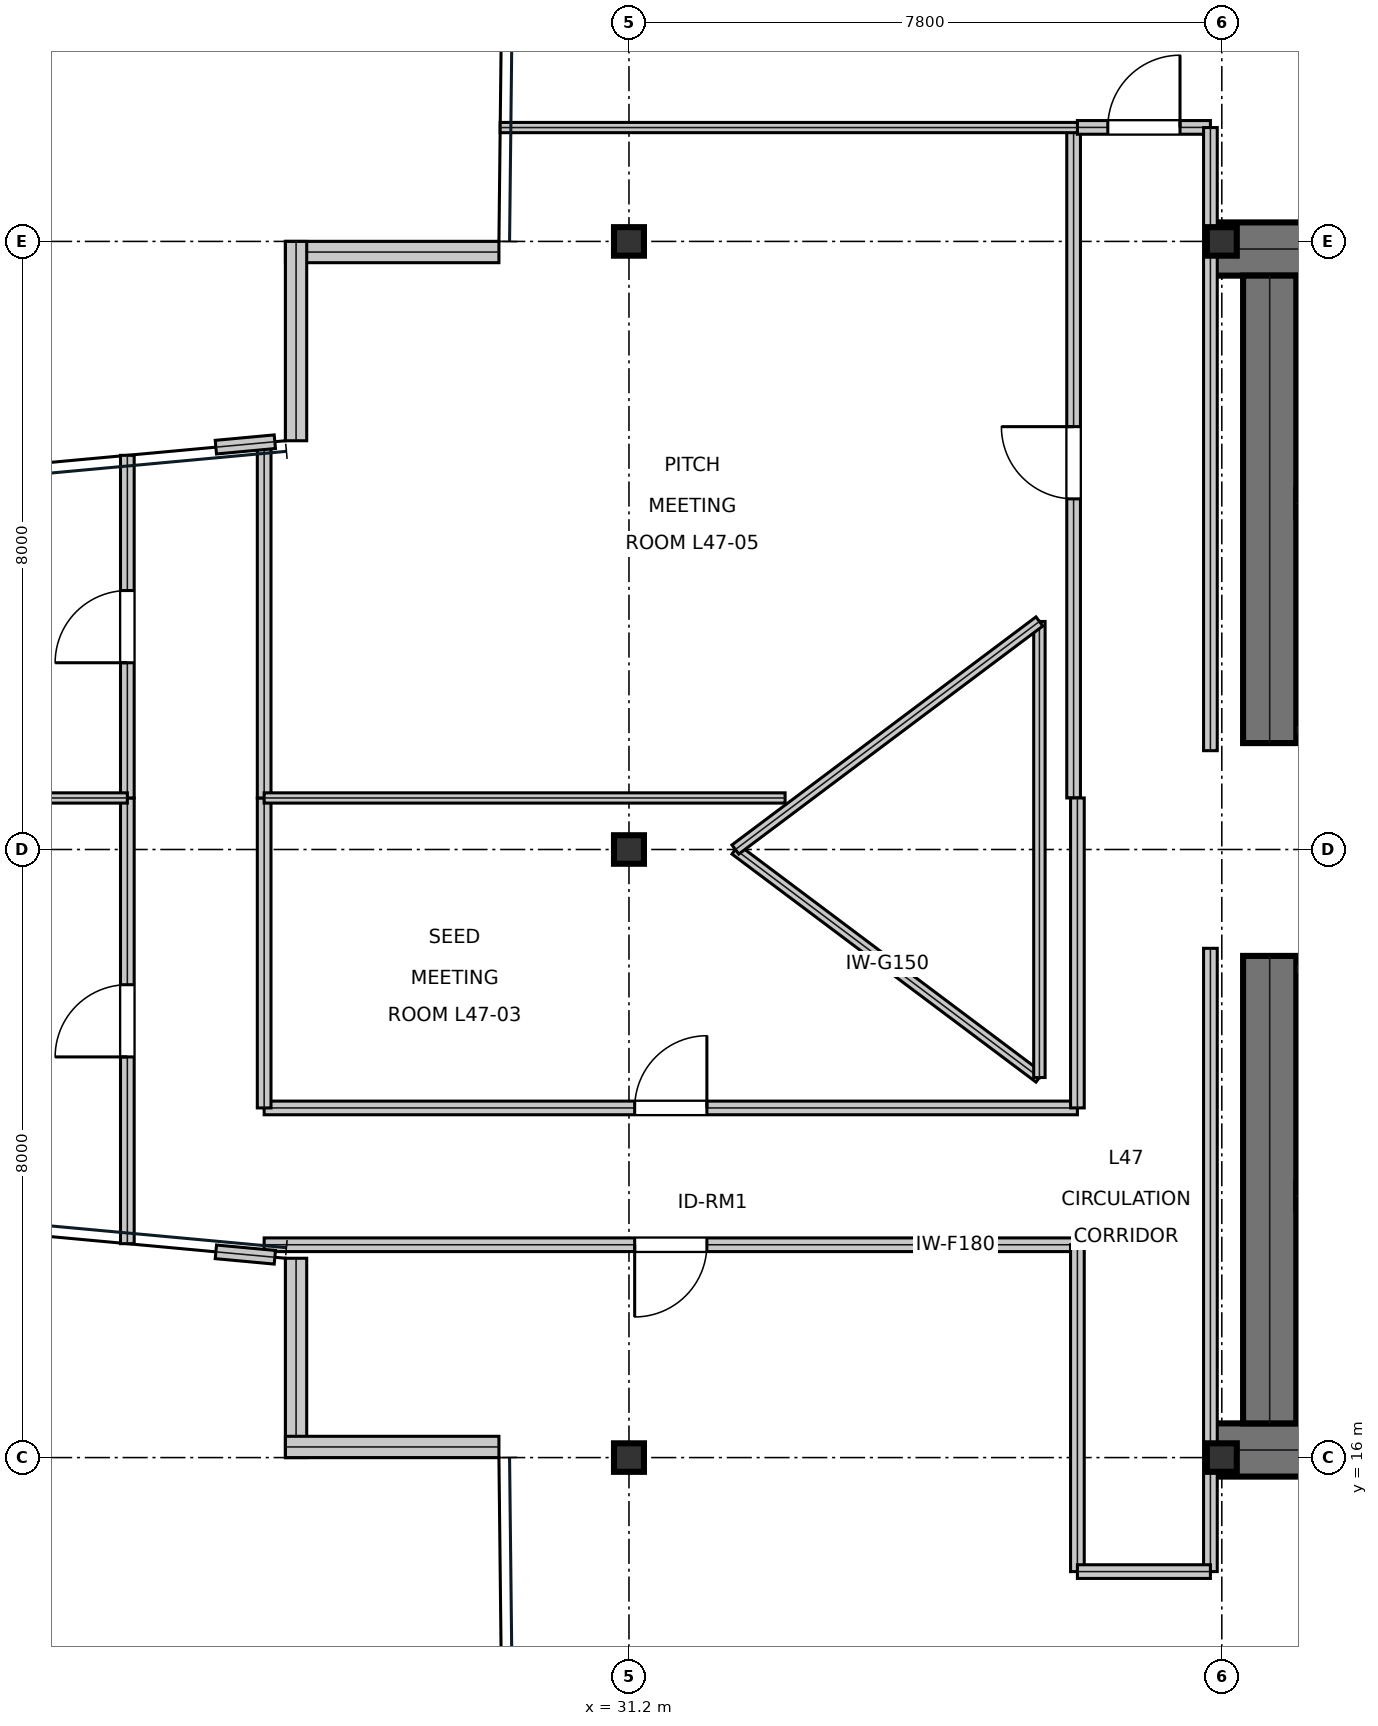
"""IFC4 building model, lengths in metres.
Left out: names, types, materials, properties, quantities, classifications, styles, units other than length and angle.
Written with IfcOpenShell. Run it as: python <this file> out.ifc"""

import sys

from ifc_helpers import new_model, si_unit, direction, frame, frame_2d, origin, origin_2d, place, context, subcontext, project, spatial, rectangle, i_section, extrude, element, fill, save


model = new_model("IFC4")
c1 = context("Model", 3, precision=1e-05, world=origin(), true_north=direction((0.0, 1.0)))
c2 = subcontext(c1, "Body", "Model", "MODEL_VIEW")
j1 = project(units=[si_unit("LENGTHUNIT", "METRE"), si_unit("PLANEANGLEUNIT", "RADIAN")], contexts=[c1])
p1 = place(None, origin())
s1 = spatial("IfcSite", under=j1, at=p1, CompositionType="ELEMENT")
p2 = place(p1, origin())
s2 = spatial("IfcBuilding", under=s1, at=p2, CompositionType="ELEMENT")
p3 = place(p2, frame((0.0, 0.0, 204.0)))
s3 = spatial("IfcBuildingStorey", under=s2, at=p3, CompositionType="ELEMENT", Elevation=204.0)
for number, where, z_axis, x_axis in (
    (1, (38.8, 31.9, 0.0), (0.0, 0.0, 1.0), (1.0, 0.0, 0.0)),
    (2, (38.8, 16.1, 0.0), (0.0, 0.0, 1.0), (1.0, 0.0, 0.0)),
):
    element("IfcWall", number, at=place(p3, frame(where, z_axis=z_axis, x_axis=x_axis)), inside=s3, PredefinedType="SHEAR", context=c2, shape_type="SweptSolid", body=[
        extrude(rectangle(XDim=16.0, YDim=0.7, at=frame_2d((8.0, 0.0))), origin(), (0.0, 0.0, 1.0), 3.79),
    ])
for number, where, z_axis, x_axis in (
    (3, (39.63, 16.45, 0.0), (0.0, 0.0, 1.0), (0.0, 1.0, 0.0)),
    (4, (39.63, 25.4, 0.0), (0.0, 0.0, 1.0), (0.0, 1.0, 0.0)),
):
    element("IfcWall", number, at=place(p3, frame(where, z_axis=z_axis, x_axis=x_axis)), inside=s3, PredefinedType="SHEAR", context=c2, shape_type="SweptSolid", body=[
        extrude(rectangle(XDim=6.15, YDim=0.7, at=frame_2d((3.075, 0.0))), origin(), (0.0, 0.0, 1.0), 3.79),
    ])
p4 = place(p3, frame((39.98, 28.555, 0.0), z_axis=(0.0, 0.0, 1.0), x_axis=(1.0, 0.0, 0.0)))
e5 = element("IfcWall", 5, at=p4, inside=s3, PredefinedType="SHEAR", context=c2, shape_type="SweptSolid", body=[
    extrude(rectangle(XDim=7.71, YDim=0.35, at=frame_2d((3.855, 0.0))), origin(), (0.0, 0.0, 1.0), 3.79),
])
p5 = place(p4, frame((0.25, 0.0, 0.0)))
e6 = element("IfcOpeningElement", 6, at=p5, cuts=e5, PredefinedType="OPENING", context=c2, shape_type="SweptSolid", body=[
    extrude(rectangle(XDim=1.1, YDim=2.15, at=frame_2d((0.55, 1.075))), frame((0.0, 0.185, 0.0), z_axis=(0.0, -1.0, 0.0), x_axis=(1.0, 0.0, 0.0)), (0.0, 0.0, 1.0), 0.37),
])
p6 = place(p3, frame((39.98, 19.445, 0.0), z_axis=(0.0, 0.0, 1.0), x_axis=(1.0, 0.0, 0.0)))
e7 = element("IfcWall", 7, at=p6, inside=s3, PredefinedType="SHEAR", context=c2, shape_type="SweptSolid", body=[
    extrude(rectangle(XDim=7.71, YDim=0.35, at=frame_2d((3.855, 0.0))), origin(), (0.0, 0.0, 1.0), 3.79),
])
p7 = place(p6, frame((0.25, 0.0, 0.0)))
e8 = element("IfcOpeningElement", 8, at=p7, cuts=e7, PredefinedType="OPENING", context=c2, shape_type="SweptSolid", body=[
    extrude(rectangle(XDim=1.1, YDim=2.15, at=frame_2d((0.55, 1.075))), frame((0.0, 0.185, 0.0), z_axis=(0.0, -1.0, 0.0), x_axis=(1.0, 0.0, 0.0)), (0.0, 0.0, 1.0), 0.37),
])
for number, where, z_axis, x_axis in (
    (9, (31.2, 16.0, 0.0), (0.0, 0.0, 1.0), (1.0, 0.0, 0.0)),
    (10, (31.2, 24.0, 0.0), (0.0, 0.0, 1.0), (1.0, 0.0, 0.0)),
    (11, (31.2, 32.0, 0.0), (0.0, 0.0, 1.0), (1.0, 0.0, 0.0)),
    (12, (39.0, 16.0, 0.0), (0.0, 0.0, 1.0), (1.0, 0.0, 0.0)),
    (13, (39.0, 32.0, 0.0), (0.0, 0.0, 1.0), (1.0, 0.0, 0.0)),
):
    element("IfcColumn", number, at=place(p3, frame(where, z_axis=z_axis, x_axis=x_axis)), inside=s3, PredefinedType="COLUMN", context=c2, shape_type="SweptSolid", body=[
        extrude(i_section(OverallWidth=0.394, OverallDepth=0.375, WebThickness=0.017, FlangeThickness=0.028, at=origin_2d()), origin(), (0.0, 0.0, 1.0), 4.044),
    ])
p8 = place(p3, frame((29.489, 31.86, 0.0), z_axis=(0.0, 0.0, 1.0), x_axis=(-1.0, 0.0, 0.0)))
e14 = element("IfcWall", 14, at=p8, inside=s3, PredefinedType="STANDARD", context=c2, shape_type="SweptSolid", body=[
    extrude(rectangle(XDim=2.809, YDim=0.28, at=frame_2d((1.405, 0.0))), origin(), (0.0, 0.0, 1.0), 3.79),
])
for number, where, z_axis, x_axis in (
    (15, (26.82, 32.0, 0.0), (0.0, 0.0, 1.0), (0.0, -1.0, 0.0)),
    (16, (26.82, 18.622, 0.0), (0.0, 0.0, 1.0), (0.0, -1.0, 0.0)),
):
    element("IfcWall", number, at=place(p3, frame(where, z_axis=z_axis, x_axis=x_axis)), inside=s3, PredefinedType="STANDARD", context=c2, shape_type="SweptSolid", body=[
        extrude(rectangle(XDim=2.622, YDim=0.28, at=frame_2d((1.311, 0.0))), origin(), (0.0, 0.0, 1.0), 3.319),
    ])
p9 = place(p3, frame((26.68, 16.14, 0.0), z_axis=(0.0, 0.0, 1.0), x_axis=(1.0, 0.0, 0.0)))
e17 = element("IfcWall", 17, at=p9, inside=s3, PredefinedType="STANDARD", context=c2, shape_type="SweptSolid", body=[
    extrude(rectangle(XDim=2.809, YDim=0.28, at=frame_2d((1.405, 0.0))), origin(), (0.0, 0.0, 1.0), 3.79),
])
p10 = place(p3, frame((39.98, 25.575, 0.0), z_axis=(0.0, 0.0, 1.0), x_axis=(1.0, 0.0, 0.0)))
e18 = element("IfcWall", 18, at=p10, inside=s3, PredefinedType="PARTITIONING", context=c2, shape_type="SweptSolid", body=[
    extrude(rectangle(XDim=5.9, YDim=0.15, at=frame_2d((2.95, 0.0))), origin(), (0.0, 0.0, 1.0), 3.79),
])
p11 = place(p10, frame((2.35, 0.0, 0.0)))
e19 = element("IfcOpeningElement", 19, at=p11, cuts=e18, PredefinedType="OPENING", context=c2, shape_type="SweptSolid", body=[
    extrude(rectangle(XDim=1.05, YDim=2.15, at=frame_2d((0.525, 1.075))), frame((0.0, 0.085, 0.0), z_axis=(0.0, -1.0, 0.0), x_axis=(1.0, 0.0, 0.0)), (0.0, 0.0, 1.0), 0.17),
])
p12 = place(p3, frame((39.98, 22.425, 0.0), z_axis=(0.0, 0.0, 1.0), x_axis=(1.0, 0.0, 0.0)))
e20 = element("IfcWall", 20, at=p12, inside=s3, PredefinedType="PARTITIONING", context=c2, shape_type="SweptSolid", body=[
    extrude(rectangle(XDim=5.9, YDim=0.15, at=frame_2d((2.95, 0.0))), origin(), (0.0, 0.0, 1.0), 3.79),
])
p13 = place(p12, frame((2.35, 0.0, 0.0)))
e21 = element("IfcOpeningElement", 21, at=p13, cuts=e20, PredefinedType="OPENING", context=c2, shape_type="SweptSolid", body=[
    extrude(rectangle(XDim=1.05, YDim=2.15, at=frame_2d((0.525, 1.075))), frame((0.0, 0.085, 0.0), z_axis=(0.0, -1.0, 0.0), x_axis=(1.0, 0.0, 0.0)), (0.0, 0.0, 1.0), 0.17),
])
p14 = place(p3, frame((26.4, 18.8, 0.0), z_axis=(0.0, 0.0, 1.0), x_axis=(1.0, 0.0, 0.0)))
e22 = element("IfcWall", 22, at=p14, inside=s3, PredefinedType="SOLIDWALL", context=c2, shape_type="SweptSolid", body=[
    extrude(rectangle(XDim=10.7, YDim=0.18, at=frame_2d((5.35, 0.0))), origin(), (0.0, 0.0, 1.0), 3.241),
])
p15 = place(p14, frame((4.875, 0.0, 0.0)))
e23 = element("IfcOpeningElement", 23, at=p15, cuts=e22, PredefinedType="OPENING", context=c2, shape_type="SweptSolid", body=[
    extrude(rectangle(XDim=0.95, YDim=2.15, at=frame_2d((0.475, 1.075))), frame((0.0, 0.1, 0.0), z_axis=(0.0, -1.0, 0.0), x_axis=(1.0, 0.0, 0.0)), (0.0, 0.0, 1.0), 0.2),
])
p16 = place(p3, frame((24.6, 18.814, 0.0), z_axis=(0.0, 0.0, 1.0), x_axis=(0.0, 1.0, 0.0)))
e24 = element("IfcWall", 24, at=p16, inside=s3, PredefinedType="SOLIDWALL", context=c2, shape_type="SweptSolid", body=[
    extrude(rectangle(XDim=5.864, YDim=0.18, at=frame_2d((2.932, 0.0))), origin(), (0.0, 0.0, 1.0), 3.241),
])
p17 = place(p16, frame((2.457, 0.0, 0.0)))
e25 = element("IfcOpeningElement", 25, at=p17, cuts=e24, PredefinedType="OPENING", context=c2, shape_type="SweptSolid", body=[
    extrude(rectangle(XDim=0.95, YDim=2.15, at=frame_2d((0.475, 1.075))), frame((0.0, 0.1, 0.0), z_axis=(0.0, -1.0, 0.0), x_axis=(1.0, 0.0, 0.0)), (0.0, 0.0, 1.0), 0.2),
])
p18 = place(p3, frame((26.4, 20.6, 0.0), z_axis=(0.0, 0.0, 1.0), x_axis=(1.0, 0.0, 0.0)))
e26 = element("IfcWall", 26, at=p18, inside=s3, PredefinedType="SOLIDWALL", context=c2, shape_type="SweptSolid", body=[
    extrude(rectangle(XDim=10.7, YDim=0.18, at=frame_2d((5.35, 0.0))), origin(), (0.0, 0.0, 1.0), 3.241),
])
p19 = place(p18, frame((4.875, 0.0, 0.0)))
e27 = element("IfcOpeningElement", 27, at=p19, cuts=e26, PredefinedType="OPENING", context=c2, shape_type="SweptSolid", body=[
    extrude(rectangle(XDim=0.95, YDim=2.15, at=frame_2d((0.475, 1.075))), frame((0.0, 0.1, 0.0), z_axis=(0.0, -1.0, 0.0), x_axis=(1.0, 0.0, 0.0)), (0.0, 0.0, 1.0), 0.2),
])
p20 = place(p3, frame((24.6, 24.678, 0.0), z_axis=(0.0, 0.0, 1.0), x_axis=(0.0, 1.0, 0.0)))
e28 = element("IfcWall", 28, at=p20, inside=s3, PredefinedType="SOLIDWALL", context=c2, shape_type="SweptSolid", body=[
    extrude(rectangle(XDim=4.508, YDim=0.18, at=frame_2d((2.254, 0.0))), origin(), (0.0, 0.0, 1.0), 3.241),
])
p21 = place(p20, frame((1.779, 0.0, 0.0)))
e29 = element("IfcOpeningElement", 29, at=p21, cuts=e28, PredefinedType="OPENING", context=c2, shape_type="SweptSolid", body=[
    extrude(rectangle(XDim=0.95, YDim=2.15, at=frame_2d((0.475, 1.075))), frame((0.0, 0.1, 0.0), z_axis=(0.0, -1.0, 0.0), x_axis=(1.0, 0.0, 0.0)), (0.0, 0.0, 1.0), 0.2),
])
p22 = place(p3, frame((37.05, 24.678, 0.0), z_axis=(0.0, 0.0, 1.0), x_axis=(0.0, 1.0, 0.0)))
e30 = element("IfcWall", 30, at=p22, inside=s3, PredefinedType="SOLIDWALL", context=c2, shape_type="SweptSolid", body=[
    extrude(rectangle(XDim=8.82, YDim=0.18, at=frame_2d((4.41, 0.0))), origin(), (0.0, 0.0, 1.0), 3.241),
])
p23 = place(p22, frame((3.935, 0.0, 0.0)))
e31 = element("IfcOpeningElement", 31, at=p23, cuts=e30, PredefinedType="OPENING", context=c2, shape_type="SweptSolid", body=[
    extrude(rectangle(XDim=0.95, YDim=2.15, at=frame_2d((0.475, 1.075))), frame((0.0, 0.1, 0.0), z_axis=(0.0, -1.0, 0.0), x_axis=(1.0, 0.0, 0.0)), (0.0, 0.0, 1.0), 0.2),
])
p24 = place(p3, frame((37.1, 33.5, 0.0), z_axis=(0.0, 0.0, 1.0), x_axis=(1.0, 0.0, 0.0)))
e32 = element("IfcWall", 32, at=p24, inside=s3, PredefinedType="SOLIDWALL", context=c2, shape_type="SweptSolid", body=[
    extrude(rectangle(XDim=1.75, YDim=0.18, at=frame_2d((0.875, 0.0))), origin(), (0.0, 0.0, 1.0), 3.241),
])
p25 = place(p24, frame((0.4, 0.0, 0.0)))
e33 = element("IfcOpeningElement", 33, at=p25, cuts=e32, PredefinedType="OPENING", context=c2, shape_type="SweptSolid", body=[
    extrude(rectangle(XDim=0.95, YDim=2.15, at=frame_2d((0.475, 1.075))), frame((0.0, 0.1, 0.0), z_axis=(0.0, -1.0, 0.0), x_axis=(1.0, 0.0, 0.0)), (0.0, 0.0, 1.0), 0.2),
])
p26 = place(p3, frame((38.85, 14.5, 0.0), z_axis=(0.0, 0.0, 1.0), x_axis=(0.0, 1.0, 0.0)))
e34 = element("IfcWall", 34, at=p26, inside=s3, PredefinedType="SOLIDWALL", context=c2, shape_type="SweptSolid", body=[
    extrude(rectangle(XDim=8.2, YDim=0.18, at=frame_2d((4.1, 0.0))), origin(), (0.0, 0.0, 1.0), 3.241),
])
p27 = place(p3, frame((37.1, 14.5, 0.0), z_axis=(0.0, 0.0, 1.0), x_axis=(0.0, 1.0, 0.0)))
e35 = element("IfcWall", 35, at=p27, inside=s3, PredefinedType="SOLIDWALL", context=c2, shape_type="SweptSolid", body=[
    extrude(rectangle(XDim=4.3, YDim=0.18, at=frame_2d((2.15, 0.0))), origin(), (0.0, 0.0, 1.0), 3.241),
])
p28 = place(p3, frame((37.1, 14.5, 0.0), z_axis=(0.0, 0.0, 1.0), x_axis=(1.0, 0.0, 0.0)))
e36 = element("IfcWall", 36, at=p28, inside=s3, PredefinedType="SOLIDWALL", context=c2, shape_type="SweptSolid", body=[
    extrude(rectangle(XDim=1.75, YDim=0.18, at=frame_2d((0.875, 0.0))), origin(), (0.0, 0.0, 1.0), 3.241),
])
p29 = place(p3, frame((25.765, 18.707, 0.0), z_axis=(0.0, 0.0, 1.0), x_axis=(0.995774178655, -0.091835641909, 0.0)))
e37 = element("IfcWall", 37, at=p29, inside=s3, PredefinedType="SOLIDWALL", context=c2, shape_type="SweptSolid", body=[
    extrude(rectangle(XDim=0.779, YDim=0.18, at=frame_2d((0.389, 0.0))), origin(), (0.0, 0.0, 1.0), 3.79),
])
p30 = place(p3, frame((26.4, 20.6, 0.0), z_axis=(0.0, 0.0, 1.0), x_axis=(0.0, 1.0, 0.0)))
e38 = element("IfcWall", 38, at=p30, inside=s3, PredefinedType="SOLIDWALL", context=c2, shape_type="SweptSolid", body=[
    extrude(rectangle(XDim=4.078, YDim=0.18, at=frame_2d((2.039, 0.0))), origin(), (0.0, 0.0, 1.0), 3.241),
])
p31 = place(p3, frame((37.1, 20.6, 0.0), z_axis=(0.0, 0.0, 1.0), x_axis=(0.0, 1.0, 0.0)))
e39 = element("IfcWall", 39, at=p31, inside=s3, PredefinedType="SOLIDWALL", context=c2, shape_type="SweptSolid", body=[
    extrude(rectangle(XDim=4.078, YDim=0.18, at=frame_2d((2.039, 0.0))), origin(), (0.0, 0.0, 1.0), 3.79),
])
p32 = place(p3, frame((26.4, 24.678, 0.0), z_axis=(0.0, 0.0, 1.0), x_axis=(0.0, 1.0, 0.0)))
e40 = element("IfcWall", 40, at=p32, inside=s3, PredefinedType="SOLIDWALL", context=c2, shape_type="SweptSolid", body=[
    extrude(rectangle(XDim=4.674, YDim=0.18, at=frame_2d((2.337, 0.0))), origin(), (0.0, 0.0, 1.0), 3.241),
])
p33 = place(p3, frame((25.765, 29.293, 0.0), z_axis=(0.0, 0.0, 1.0), x_axis=(0.995774178655, 0.091835641909, 0.0)))
e41 = element("IfcWall", 41, at=p33, inside=s3, PredefinedType="SOLIDWALL", context=c2, shape_type="SweptSolid", body=[
    extrude(rectangle(XDim=0.779, YDim=0.18, at=frame_2d((0.389, 0.0))), origin(), (0.0, 0.0, 1.0), 3.79),
])
p34 = place(p3, frame((38.85, 25.3, 0.0), z_axis=(0.0, 0.0, 1.0), x_axis=(0.0, 1.0, 0.0)))
e42 = element("IfcWall", 42, at=p34, inside=s3, PredefinedType="SOLIDWALL", context=c2, shape_type="SweptSolid", body=[
    extrude(rectangle(XDim=8.198, YDim=0.18, at=frame_2d((4.099, 0.0))), origin(), (0.0, 0.0, 1.0), 3.241),
])
p35 = place(p3, frame((12.991, 24.678, 0.0), z_axis=(0.0, 0.0, 1.0), x_axis=(1.0, 0.0, 0.0)))
e43 = element("IfcWall", 43, at=p35, inside=s3, PredefinedType="PARTITIONING", context=c2, shape_type="SweptSolid", body=[
    extrude(rectangle(XDim=11.609, YDim=0.135, at=frame_2d((5.805, 0.0))), origin(), (0.0, 0.0, 1.0), 3.319),
])
p36 = place(p3, frame((26.4, 24.678, 0.0), z_axis=(0.0, 0.0, 1.0), x_axis=(1.0, 0.0, 0.0)))
e44 = element("IfcWall", 44, at=p36, inside=s3, PredefinedType="PARTITIONING", context=c2, shape_type="SweptSolid", body=[
    extrude(rectangle(XDim=6.854, YDim=0.135, at=frame_2d((3.427, 0.0))), origin(), (0.0, 0.0, 1.0), 3.241),
])
p37 = place(p3, frame((29.506, 33.498, 0.0), z_axis=(0.0, 0.0, 1.0), x_axis=(1.0, 0.0, 0.0)))
e45 = element("IfcWall", 45, at=p37, inside=s3, PredefinedType="PARTITIONING", context=c2, shape_type="SweptSolid", body=[
    extrude(rectangle(XDim=7.594, YDim=0.135, at=frame_2d((3.797, 0.0))), origin(), (0.0, 0.0, 1.0), 3.319),
])
p38 = place(p3, frame((32.6, 24.0, 0.0), z_axis=(0.0, 0.0, 1.0), x_axis=(0.8, -0.6, 0.0)))
e46 = element("IfcWall", 46, at=p38, inside=s3, PredefinedType="MOVABLE", context=c2, shape_type="SweptSolid", body=[
    extrude(rectangle(XDim=5.0, YDim=0.15, at=frame_2d((2.5, 0.0))), origin(), (0.0, 0.0, 1.0), 3.79),
])
p39 = place(p3, frame((36.6, 21.0, 0.0), z_axis=(0.0, 0.0, 1.0), x_axis=(0.0, 1.0, 0.0)))
e47 = element("IfcWall", 47, at=p39, inside=s3, PredefinedType="MOVABLE", context=c2, shape_type="SweptSolid", body=[
    extrude(rectangle(XDim=6.0, YDim=0.15, at=frame_2d((3.0, 0.0))), origin(), (0.0, 0.0, 1.0), 3.79),
])
p40 = place(p3, frame((36.6, 27.0, 0.0), z_axis=(0.0, 0.0, 1.0), x_axis=(-0.8, -0.6, 0.0)))
e48 = element("IfcWall", 48, at=p40, inside=s3, PredefinedType="MOVABLE", context=c2, shape_type="SweptSolid", body=[
    extrude(rectangle(XDim=5.0, YDim=0.15, at=frame_2d((2.5, 0.0))), origin(), (0.0, 0.0, 1.0), 3.79),
])
p41 = place(p15, frame((0.95, 0.0, 0.0), z_axis=(0.0, 0.0, 1.0), x_axis=(-1.0, 0.0, 0.0)))
e49 = element("IfcDoor", 49, at=p41, inside=s3, OperationType="SINGLE_SWING_RIGHT", PredefinedType="DOOR", context=c2, shape_type="SweptSolid", body=[
    extrude(rectangle(XDim=0.95, YDim=2.15, at=frame_2d((0.475, 1.075))), frame((0.0, 0.025, 0.0), z_axis=(0.0, -1.0, 0.0), x_axis=(1.0, 0.0, 0.0)), (0.0, 0.0, 1.0), 0.05),
])
fill(e23, e49)
p42 = place(p17, origin())
e50 = element("IfcDoor", 50, at=p42, inside=s3, OperationType="SINGLE_SWING_LEFT", PredefinedType="DOOR", context=c2, shape_type="SweptSolid", body=[
    extrude(rectangle(XDim=0.95, YDim=2.15, at=frame_2d((0.475, 1.075))), frame((0.0, 0.025, 0.0), z_axis=(0.0, -1.0, 0.0), x_axis=(1.0, 0.0, 0.0)), (0.0, 0.0, 1.0), 0.05),
])
fill(e25, e50)
p43 = place(p19, origin())
e51 = element("IfcDoor", 51, at=p43, inside=s3, OperationType="SINGLE_SWING_RIGHT", PredefinedType="DOOR", context=c2, shape_type="SweptSolid", body=[
    extrude(rectangle(XDim=0.95, YDim=2.15, at=frame_2d((0.475, 1.075))), frame((0.0, 0.025, 0.0), z_axis=(0.0, -1.0, 0.0), x_axis=(1.0, 0.0, 0.0)), (0.0, 0.0, 1.0), 0.05),
])
fill(e27, e51)
p44 = place(p21, origin())
e52 = element("IfcDoor", 52, at=p44, inside=s3, OperationType="SINGLE_SWING_LEFT", PredefinedType="DOOR", context=c2, shape_type="SweptSolid", body=[
    extrude(rectangle(XDim=0.95, YDim=2.15, at=frame_2d((0.475, 1.075))), frame((0.0, 0.025, 0.0), z_axis=(0.0, -1.0, 0.0), x_axis=(1.0, 0.0, 0.0)), (0.0, 0.0, 1.0), 0.05),
])
fill(e29, e52)
p45 = place(p23, origin())
e53 = element("IfcDoor", 53, at=p45, inside=s3, OperationType="SINGLE_SWING_RIGHT", PredefinedType="DOOR", context=c2, shape_type="SweptSolid", body=[
    extrude(rectangle(XDim=0.95, YDim=2.15, at=frame_2d((0.475, 1.075))), frame((0.0, 0.025, 0.0), z_axis=(0.0, -1.0, 0.0), x_axis=(1.0, 0.0, 0.0)), (0.0, 0.0, 1.0), 0.05),
])
fill(e31, e53)
p46 = place(p25, origin())
e54 = element("IfcDoor", 54, at=p46, inside=s3, OperationType="SINGLE_SWING_RIGHT", PredefinedType="DOOR", context=c2, shape_type="SweptSolid", body=[
    extrude(rectangle(XDim=0.95, YDim=2.15, at=frame_2d((0.475, 1.075))), frame((0.0, 0.025, 0.0), z_axis=(0.0, -1.0, 0.0), x_axis=(1.0, 0.0, 0.0)), (0.0, 0.0, 1.0), 0.05),
])
fill(e33, e54)
save(model, sys.argv[1])
